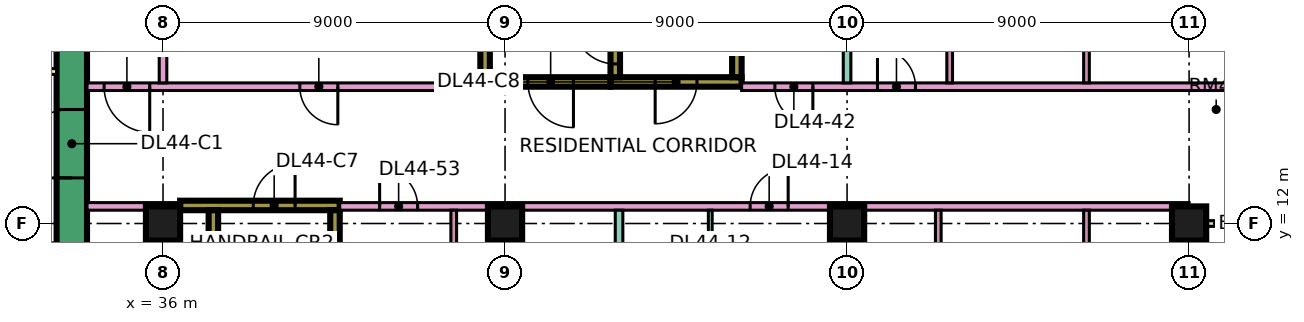
"""IFC4 building model, lengths in metres.
Left out: names, types, materials, properties, quantities, classifications, styles, units other than length and angle.
Written with IfcOpenShell. Run it as: python <this file> out.ifc"""

import sys

from ifc_helpers import new_model, si_unit, direction, frame, frame_2d, origin, origin_2d, place, context, subcontext, project, spatial, rectangle, extrude, element, fill, save


model = new_model("IFC4")
c1 = context("Model", 3, precision=1e-05, world=origin(), true_north=direction((0.0, 1.0)))
c2 = subcontext(c1, "Body", "Model", "MODEL_VIEW")
j1 = project(units=[si_unit("LENGTHUNIT", "METRE"), si_unit("PLANEANGLEUNIT", "RADIAN")], contexts=[c1])
p1 = place(None, origin())
s1 = spatial("IfcSite", under=j1, at=p1, CompositionType="ELEMENT")
p2 = place(p1, origin())
s2 = spatial("IfcBuilding", under=s1, at=p2, CompositionType="ELEMENT")
p3 = place(p2, frame((0.0, 0.0, 191.15)))
s3 = spatial("IfcBuildingStorey", under=s2, at=p3, CompositionType="ELEMENT", Elevation=191.15)
for number, where, z_axis, x_axis in (
    (1, (36.0, 12.0, 0.0), (0.0, 0.0, 1.0), (1.0, 0.0, 0.0)),
    (2, (45.0, 12.0, 0.0), (0.0, 0.0, 1.0), (1.0, 0.0, 0.0)),
    (3, (54.0, 12.0, 0.0), (0.0, 0.0, 1.0), (1.0, 0.0, 0.0)),
    (4, (63.0, 12.0, 0.0), (0.0, 0.0, 1.0), (1.0, 0.0, 0.0)),
):
    element("IfcColumn", number, at=place(p3, frame(where, z_axis=z_axis, x_axis=x_axis)), inside=s3, PredefinedType="COLUMN", context=c2, shape_type="SweptSolid", body=[
        extrude(rectangle(XDim=0.9, YDim=0.9, at=origin_2d()), origin(), (0.0, 0.0, 1.0), 3.75),
    ])
p4 = place(p3, frame((33.6, 7.8, 0.0), z_axis=(0.0, 0.0, 1.0), x_axis=(0.0, 1.0, 0.0)))
e5 = element("IfcWall", 5, at=p4, inside=s3, PredefinedType="SHEAR", context=c2, shape_type="SweptSolid", body=[
    extrude(rectangle(XDim=11.4, YDim=0.8, at=frame_2d((5.7, 0.0))), origin(), (0.0, 0.0, 1.0), 3.75),
])
p5 = place(p4, frame((5.4, 0.0, 0.0)))
e6 = element("IfcOpeningElement", 6, at=p5, cuts=e5, PredefinedType="OPENING", context=c2, shape_type="SweptSolid", body=[
    extrude(rectangle(XDim=1.8, YDim=2.4, at=frame_2d((0.9, 1.2))), frame((0.0, 0.41, 0.0), z_axis=(0.0, -1.0, 0.0), x_axis=(1.0, 0.0, 0.0)), (0.0, 0.0, 1.0), 0.82),
])
p6 = place(p3, frame((36.45, 12.475, 0.0), z_axis=(0.0, 0.0, 1.0), x_axis=(1.0, 0.0, 0.0)))
e7 = element("IfcWall", 7, at=p6, inside=s3, PredefinedType="SHEAR", context=c2, shape_type="SweptSolid", body=[
    extrude(rectangle(XDim=4.2, YDim=0.25, at=frame_2d((2.1, 0.0))), origin(), (0.0, 0.0, 1.0), 3.75),
])
p7 = place(p6, frame((1.925, 0.0, 0.0)))
e8 = element("IfcOpeningElement", 8, at=p7, cuts=e7, PredefinedType="OPENING", context=c2, shape_type="SweptSolid", body=[
    extrude(rectangle(XDim=1.1, YDim=2.2, at=frame_2d((0.55, 1.1))), frame((0.0, 0.135, 0.0), z_axis=(0.0, -1.0, 0.0), x_axis=(1.0, 0.0, 0.0)), (0.0, 0.0, 1.0), 0.27),
])
for number, where, z_axis, x_axis in (
    (9, (37.325, 5.85, 0.0), (0.0, 0.0, 1.0), (0.0, 1.0, 0.0)),
    (10, (40.525, 5.85, 0.0), (0.0, 0.0, 1.0), (0.0, 1.0, 0.0)),
):
    element("IfcWall", number, at=place(p3, frame(where, z_axis=z_axis, x_axis=x_axis)), inside=s3, PredefinedType="SHEAR", context=c2, shape_type="SweptSolid", body=[
        extrude(rectangle(XDim=6.5, YDim=0.25, at=frame_2d((3.25, 0.0))), origin(), (0.0, 0.0, 1.0), 3.75),
    ])
p8 = place(p3, frame((47.775, 15.725, 0.0), z_axis=(0.0, 0.0, 1.0), x_axis=(1.0, 0.0, 0.0)))
e11 = element("IfcWall", 11, at=p8, inside=s3, PredefinedType="SHEAR", context=c2, shape_type="SweptSolid", body=[
    extrude(rectangle(XDim=3.45, YDim=0.25, at=frame_2d((1.725, 0.0))), origin(), (0.0, 0.0, 1.0), 3.75),
])
p9 = place(p8, frame((1.175, 0.0, 0.0)))
e12 = element("IfcOpeningElement", 12, at=p9, cuts=e11, PredefinedType="OPENING", context=c2, shape_type="SweptSolid", body=[
    extrude(rectangle(XDim=1.1, YDim=2.2, at=frame_2d((0.55, 1.1))), frame((0.0, 0.135, 0.0), z_axis=(0.0, -1.0, 0.0), x_axis=(1.0, 0.0, 0.0)), (0.0, 0.0, 1.0), 0.27),
])
p10 = place(p3, frame((47.9, 15.85, 0.0), z_axis=(0.0, 0.0, 1.0), x_axis=(0.0, 1.0, 0.0)))
e13 = element("IfcWall", 13, at=p10, inside=s3, PredefinedType="SHEAR", context=c2, shape_type="SweptSolid", body=[
    extrude(rectangle(XDim=6.5, YDim=0.25, at=frame_2d((3.25, 0.0))), origin(), (0.0, 0.0, 1.0), 3.75),
])
p11 = place(p10, frame((0.35, 0.0, 0.0)))
e14 = element("IfcOpeningElement", 14, at=p11, cuts=e13, PredefinedType="OPENING", context=c2, shape_type="SweptSolid", body=[
    extrude(rectangle(XDim=1.1, YDim=2.2, at=frame_2d((0.55, 1.1))), frame((0.0, 0.135, 0.0), z_axis=(0.0, -1.0, 0.0), x_axis=(1.0, 0.0, 0.0)), (0.0, 0.0, 1.0), 0.27),
])
p12 = place(p3, frame((51.1, 15.85, 0.0), z_axis=(0.0, 0.0, 1.0), x_axis=(0.0, 1.0, 0.0)))
e15 = element("IfcWall", 15, at=p12, inside=s3, PredefinedType="SHEAR", context=c2, shape_type="SweptSolid", body=[
    extrude(rectangle(XDim=6.5, YDim=0.25, at=frame_2d((3.25, 0.0))), origin(), (0.0, 0.0, 1.0), 3.75),
])
p13 = place(p3, frame((44.35, 15.725, 0.0), z_axis=(0.0, 0.0, 1.0), x_axis=(1.0, 0.0, 0.0)))
e16 = element("IfcWall", 16, at=p13, inside=s3, PredefinedType="SHEAR", context=c2, shape_type="SweptSolid", body=[
    extrude(rectangle(XDim=3.425, YDim=0.25, at=frame_2d((1.712, 0.0))), origin(), (0.0, 0.0, 1.0), 3.75),
])
p14 = place(p13, frame((1.25, 0.0, 0.0)))
e17 = element("IfcOpeningElement", 17, at=p14, cuts=e16, PredefinedType="OPENING", context=c2, shape_type="SweptSolid", body=[
    extrude(rectangle(XDim=1.2, YDim=2.2, at=frame_2d((0.6, 1.1))), frame((0.0, 0.135, 0.0), z_axis=(0.0, -1.0, 0.0), x_axis=(1.0, 0.0, 0.0)), (0.0, 0.0, 1.0), 0.27),
])
p15 = place(p3, frame((44.475, 15.85, 0.0), z_axis=(0.0, 0.0, 1.0), x_axis=(0.0, 1.0, 0.0)))
e18 = element("IfcWall", 18, at=p15, inside=s3, PredefinedType="SHEAR", context=c2, shape_type="SweptSolid", body=[
    extrude(rectangle(XDim=6.5, YDim=0.25, at=frame_2d((3.25, 0.0))), origin(), (0.0, 0.0, 1.0), 3.75),
])
p16 = place(p15, frame((1.75, 0.0, 0.0)))
e19 = element("IfcOpeningElement", 19, at=p16, cuts=e18, PredefinedType="OPENING", context=c2, shape_type="SweptSolid", body=[
    extrude(rectangle(XDim=1.1, YDim=2.2, at=frame_2d((0.55, 1.1))), frame((0.0, 0.135, 0.0), z_axis=(0.0, -1.0, 0.0), x_axis=(1.0, 0.0, 0.0)), (0.0, 0.0, 1.0), 0.27),
])
p17 = place(p15, frame((4.3, 0.0, 0.0)))
e20 = element("IfcOpeningElement", 20, at=p17, cuts=e18, PredefinedType="OPENING", context=c2, shape_type="SweptSolid", body=[
    extrude(rectangle(XDim=1.1, YDim=2.2, at=frame_2d((0.55, 1.1))), frame((0.0, 0.135, 0.0), z_axis=(0.0, -1.0, 0.0), x_axis=(1.0, 0.0, 0.0)), (0.0, 0.0, 1.0), 0.27),
])
p18 = place(p3, frame((63.0, 1.575, 0.0), z_axis=(0.0, 0.0, 1.0), x_axis=(0.0, 1.0, 0.0)))
e21 = element("IfcWall", 21, at=p18, inside=s3, PredefinedType="SOLIDWALL", context=c2, shape_type="SweptSolid", body=[
    extrude(rectangle(XDim=10.35, YDim=0.15, at=frame_2d((5.175, 0.0))), origin(), (0.0, 0.0, 1.0), 3.35),
])
p19 = place(p18, frame((1.837, 0.0, 0.0)))
e22 = element("IfcOpeningElement", 22, at=p19, cuts=e21, PredefinedType="OPENING", context=c2, shape_type="SweptSolid", body=[
    extrude(rectangle(XDim=1.8, YDim=2.4, at=frame_2d((0.9, 1.2))), frame((0.0, 0.085, 0.0), z_axis=(0.0, -1.0, 0.0), x_axis=(1.0, 0.0, 0.0)), (0.0, 0.0, 1.0), 0.17),
])
p20 = place(p18, frame((7.675, 0.0, 1.7)))
e23 = element("IfcOpeningElement", 23, at=p20, cuts=e21, PredefinedType="OPENING", context=c2, shape_type="SweptSolid", body=[
    extrude(rectangle(XDim=1.2, YDim=0.9, at=frame_2d((0.6, 0.45))), frame((0.0, 0.085, 0.0), z_axis=(0.0, -1.0, 0.0), x_axis=(1.0, 0.0, 0.0)), (0.0, 0.0, 1.0), 0.17),
])
p21 = place(p3, frame((64.5, 12.0, 0.0), z_axis=(0.0, 0.0, 1.0), x_axis=(-1.0, 0.0, 0.0)))
e24 = element("IfcWall", 24, at=p21, inside=s3, PredefinedType="SOLIDWALL", context=c2, shape_type="SweptSolid", body=[
    extrude(rectangle(XDim=1.5, YDim=0.15, at=frame_2d((0.75, 0.0))), origin(), (0.0, 0.0, 1.0), 3.35),
])
p22 = place(p3, frame((31.2, 16.0, 0.0), z_axis=(0.0, 0.0, 1.0), x_axis=(1.0, 0.0, 0.0)))
e25 = element("IfcWall", 25, at=p22, inside=s3, PredefinedType="PARTITIONING", context=c2, shape_type="SweptSolid", body=[
    extrude(rectangle(XDim=2.0, YDim=0.15, at=frame_2d((1.0, 0.0))), origin(), (0.0, 0.0, 1.0), 3.35),
])
p23 = place(p3, frame((34.0, 12.45, 0.0), z_axis=(0.0, 0.0, 1.0), x_axis=(1.0, 0.0, 0.0)))
e26 = element("IfcWall", 26, at=p23, inside=s3, PredefinedType="PARTITIONING", context=c2, shape_type="SweptSolid", body=[
    extrude(rectangle(XDim=2.451, YDim=0.2, at=frame_2d((1.226, 0.0))), origin(), (0.0, 0.0, 1.0), 3.35),
])
p24 = place(p3, frame((34.0, 15.6, 0.0), z_axis=(0.0, 0.0, 1.0), x_axis=(1.0, 0.0, 0.0)))
e27 = element("IfcWall", 27, at=p24, inside=s3, PredefinedType="PARTITIONING", context=c2, shape_type="SweptSolid", body=[
    extrude(rectangle(XDim=10.35, YDim=0.2, at=frame_2d((5.175, 0.0))), origin(), (0.0, 0.0, 1.0), 3.35),
])
p25 = place(p24, frame((5.6, 0.0, 0.0)))
e28 = element("IfcOpeningElement", 28, at=p25, cuts=e27, PredefinedType="OPENING", context=c2, shape_type="SweptSolid", body=[
    extrude(rectangle(XDim=1.0, YDim=2.1, at=frame_2d((0.5, 1.05))), frame((0.0, 0.11, 0.0), z_axis=(0.0, -1.0, 0.0), x_axis=(1.0, 0.0, 0.0)), (0.0, 0.0, 1.0), 0.22),
])
p26 = place(p24, frame((0.45, 0.0, 0.0)))
e29 = element("IfcOpeningElement", 29, at=p26, cuts=e27, PredefinedType="OPENING", context=c2, shape_type="SweptSolid", body=[
    extrude(rectangle(XDim=1.2, YDim=2.1, at=frame_2d((0.6, 1.05))), frame((0.0, 0.11, 0.0), z_axis=(0.0, -1.0, 0.0), x_axis=(1.0, 0.0, 0.0)), (0.0, 0.0, 1.0), 0.22),
])
p27 = place(p3, frame((36.0, 15.7, 0.0), z_axis=(0.0, 0.0, 1.0), x_axis=(0.0, 1.0, 0.0)))
e30 = element("IfcWall", 30, at=p27, inside=s3, PredefinedType="PARTITIONING", context=c2, shape_type="SweptSolid", body=[
    extrude(rectangle(XDim=8.3, YDim=0.2, at=frame_2d((4.15, 0.0))), origin(), (0.0, 0.0, 1.0), 3.35),
])
p28 = place(p3, frame((40.65, 12.45, 0.0), z_axis=(0.0, 0.0, 1.0), x_axis=(1.0, 0.0, 0.0)))
e31 = element("IfcWall", 31, at=p28, inside=s3, PredefinedType="PARTITIONING", context=c2, shape_type="SweptSolid", body=[
    extrude(rectangle(XDim=22.35, YDim=0.2, at=frame_2d((11.175, 0.0))), origin(), (0.0, 0.0, 1.0), 3.35),
])
p29 = place(p28, frame((10.8, 0.0, 0.0)))
e32 = element("IfcOpeningElement", 32, at=p29, cuts=e31, PredefinedType="OPENING", context=c2, shape_type="SweptSolid", body=[
    extrude(rectangle(XDim=1.0, YDim=2.1, at=frame_2d((0.5, 1.05))), frame((0.0, 0.11, 0.0), z_axis=(0.0, -1.0, 0.0), x_axis=(1.0, 0.0, 0.0)), (0.0, 0.0, 1.0), 0.22),
])
p30 = place(p28, frame((1.05, 0.0, 0.0)))
e33 = element("IfcOpeningElement", 33, at=p30, cuts=e31, PredefinedType="OPENING", context=c2, shape_type="SweptSolid", body=[
    extrude(rectangle(XDim=1.0, YDim=2.1, at=frame_2d((0.5, 1.05))), frame((0.0, 0.11, 0.0), z_axis=(0.0, -1.0, 0.0), x_axis=(1.0, 0.0, 0.0)), (0.0, 0.0, 1.0), 0.22),
])
p31 = place(p3, frame((43.65, 5.825, 0.0), z_axis=(0.0, 0.0, 1.0), x_axis=(0.0, 1.0, 0.0)))
e34 = element("IfcWall", 34, at=p31, inside=s3, PredefinedType="PARTITIONING", context=c2, shape_type="SweptSolid", body=[
    extrude(rectangle(XDim=6.525, YDim=0.15, at=frame_2d((3.263, 0.0))), origin(), (0.0, 0.0, 1.0), 3.35),
])
p32 = place(p31, frame((4.425, 0.0, 0.0)))
e35 = element("IfcOpeningElement", 35, at=p32, cuts=e34, PredefinedType="OPENING", context=c2, shape_type="SweptSolid", body=[
    extrude(rectangle(XDim=0.9, YDim=2.1, at=frame_2d((0.45, 1.05))), frame((0.0, 0.085, 0.0), z_axis=(0.0, -1.0, 0.0), x_axis=(1.0, 0.0, 0.0)), (0.0, 0.0, 1.0), 0.17),
])
p33 = place(p3, frame((48.0, 0.0, 0.0), z_axis=(0.0, 0.0, 1.0), x_axis=(0.0, 1.0, 0.0)))
e36 = element("IfcWall", 36, at=p33, inside=s3, PredefinedType="PARTITIONING", context=c2, shape_type="SweptSolid", body=[
    extrude(rectangle(XDim=12.35, YDim=0.2, at=frame_2d((6.175, 0.0))), origin(), (0.0, 0.0, 1.0), 3.35),
])
p34 = place(p3, frame((50.4, 8.2, 0.0), z_axis=(0.0, 0.0, 1.0), x_axis=(0.0, 1.0, 0.0)))
e37 = element("IfcWall", 37, at=p34, inside=s3, PredefinedType="PARTITIONING", context=c2, shape_type="SweptSolid", body=[
    extrude(rectangle(XDim=4.15, YDim=0.1, at=frame_2d((2.075, 0.0))), origin(), (0.0, 0.0, 1.0), 3.35),
])
p35 = place(p34, frame((1.7, 0.0, 0.0)))
e38 = element("IfcOpeningElement", 38, at=p35, cuts=e37, PredefinedType="OPENING", context=c2, shape_type="SweptSolid", body=[
    extrude(rectangle(XDim=0.9, YDim=2.1, at=frame_2d((0.45, 1.05))), frame((0.0, 0.06, 0.0), z_axis=(0.0, -1.0, 0.0), x_axis=(1.0, 0.0, 0.0)), (0.0, 0.0, 1.0), 0.12),
])
p36 = place(p3, frame((51.225, 15.6, 0.0), z_axis=(0.0, 0.0, 1.0), x_axis=(1.0, 0.0, 0.0)))
e39 = element("IfcWall", 39, at=p36, inside=s3, PredefinedType="PARTITIONING", context=c2, shape_type="SweptSolid", body=[
    extrude(rectangle(XDim=13.125, YDim=0.2, at=frame_2d((6.562, 0.0))), origin(), (0.0, 0.0, 1.0), 3.35),
])
p37 = place(p36, frame((3.575, 0.0, 0.0)))
e40 = element("IfcOpeningElement", 40, at=p37, cuts=e39, PredefinedType="OPENING", context=c2, shape_type="SweptSolid", body=[
    extrude(rectangle(XDim=1.0, YDim=2.1, at=frame_2d((0.5, 1.05))), frame((0.0, 0.11, 0.0), z_axis=(0.0, -1.0, 0.0), x_axis=(1.0, 0.0, 0.0)), (0.0, 0.0, 1.0), 0.22),
])
p38 = place(p36, frame((0.875, 0.0, 0.0)))
e41 = element("IfcOpeningElement", 41, at=p38, cuts=e39, PredefinedType="OPENING", context=c2, shape_type="SweptSolid", body=[
    extrude(rectangle(XDim=1.0, YDim=2.1, at=frame_2d((0.5, 1.05))), frame((0.0, 0.11, 0.0), z_axis=(0.0, -1.0, 0.0), x_axis=(1.0, 0.0, 0.0)), (0.0, 0.0, 1.0), 0.22),
])
p39 = place(p3, frame((54.0, 15.7, 0.0), z_axis=(0.0, 0.0, 1.0), x_axis=(0.0, 1.0, 0.0)))
e42 = element("IfcWall", 42, at=p39, inside=s3, PredefinedType="PARTITIONING", context=c2, shape_type="SweptSolid", body=[
    extrude(rectangle(XDim=8.226, YDim=0.2, at=frame_2d((4.113, 0.0))), origin(), (0.0, 0.0, 1.0), 3.35),
])
p40 = place(p3, frame((56.4, 8.325, 0.0), z_axis=(0.0, 0.0, 1.0), x_axis=(0.0, 1.0, 0.0)))
e43 = element("IfcWall", 43, at=p40, inside=s3, PredefinedType="PARTITIONING", context=c2, shape_type="SweptSolid", body=[
    extrude(rectangle(XDim=4.025, YDim=0.15, at=frame_2d((2.013, 0.0))), origin(), (0.0, 0.0, 1.0), 3.35),
])
p41 = place(p3, frame((56.7, 15.7, 0.0), z_axis=(0.0, 0.0, 1.0), x_axis=(0.0, 1.0, 0.0)))
e44 = element("IfcWall", 44, at=p41, inside=s3, PredefinedType="PARTITIONING", context=c2, shape_type="SweptSolid", body=[
    extrude(rectangle(XDim=2.525, YDim=0.15, at=frame_2d((1.263, 0.0))), origin(), (0.0, 0.0, 1.0), 3.35),
])
p42 = place(p3, frame((60.3, 8.325, 0.0), z_axis=(0.0, 0.0, 1.0), x_axis=(0.0, 1.0, 0.0)))
e45 = element("IfcWall", 45, at=p42, inside=s3, PredefinedType="PARTITIONING", context=c2, shape_type="SweptSolid", body=[
    extrude(rectangle(XDim=4.025, YDim=0.15, at=frame_2d((2.013, 0.0))), origin(), (0.0, 0.0, 1.0), 3.35),
])
p43 = place(p3, frame((60.3, 15.7, 0.0), z_axis=(0.0, 0.0, 1.0), x_axis=(0.0, 1.0, 0.0)))
e46 = element("IfcWall", 46, at=p43, inside=s3, PredefinedType="PARTITIONING", context=c2, shape_type="SweptSolid", body=[
    extrude(rectangle(XDim=2.525, YDim=0.15, at=frame_2d((1.263, 0.0))), origin(), (0.0, 0.0, 1.0), 3.35),
])
p44 = place(p5, origin())
e47 = element("IfcDoor", 47, at=p44, inside=s3, OperationType="DOUBLE_DOOR_SINGLE_SWING", PredefinedType="DOOR", context=c2, shape_type="SweptSolid", body=[
    extrude(rectangle(XDim=1.8, YDim=2.4, at=frame_2d((0.9, 1.2))), frame((0.0, 0.025, 0.0), z_axis=(0.0, -1.0, 0.0), x_axis=(1.0, 0.0, 0.0)), (0.0, 0.0, 1.0), 0.05),
])
fill(e6, e47)
p45 = place(p7, frame((1.1, 0.0, 0.0), z_axis=(0.0, 0.0, 1.0), x_axis=(-1.0, 0.0, 0.0)))
e48 = element("IfcDoor", 48, at=p45, inside=s3, OperationType="SINGLE_SWING_RIGHT", PredefinedType="DOOR", context=c2, shape_type="SweptSolid", body=[
    extrude(rectangle(XDim=1.1, YDim=2.2, at=frame_2d((0.55, 1.1))), frame((0.0, 0.025, 0.0), z_axis=(0.0, -1.0, 0.0), x_axis=(1.0, 0.0, 0.0)), (0.0, 0.0, 1.0), 0.05),
])
fill(e8, e48)
p46 = place(p9, frame((1.1, 0.0, 0.0), z_axis=(0.0, 0.0, 1.0), x_axis=(-1.0, 0.0, 0.0)))
e49 = element("IfcDoor", 49, at=p46, inside=s3, OperationType="SINGLE_SWING_LEFT", PredefinedType="DOOR", context=c2, shape_type="SweptSolid", body=[
    extrude(rectangle(XDim=1.1, YDim=2.2, at=frame_2d((0.55, 1.1))), frame((0.0, 0.025, 0.0), z_axis=(0.0, -1.0, 0.0), x_axis=(1.0, 0.0, 0.0)), (0.0, 0.0, 1.0), 0.05),
])
fill(e12, e49)
p47 = place(p14, origin())
e50 = element("IfcDoor", 50, at=p47, inside=s3, OperationType="SINGLE_SWING_RIGHT", PredefinedType="DOOR", context=c2, shape_type="SweptSolid", body=[
    extrude(rectangle(XDim=1.2, YDim=2.2, at=frame_2d((0.6, 1.1))), frame((0.0, 0.025, 0.0), z_axis=(0.0, -1.0, 0.0), x_axis=(1.0, 0.0, 0.0)), (0.0, 0.0, 1.0), 0.05),
])
fill(e17, e50)
p48 = place(p11, frame((1.1, 0.0, 0.0), z_axis=(0.0, 0.0, 1.0), x_axis=(-1.0, 0.0, 0.0)))
e51 = element("IfcDoor", 51, at=p48, inside=s3, OperationType="SINGLE_SWING_RIGHT", PredefinedType="DOOR", context=c2, shape_type="SweptSolid", body=[
    extrude(rectangle(XDim=1.1, YDim=2.2, at=frame_2d((0.55, 1.1))), frame((0.0, 0.025, 0.0), z_axis=(0.0, -1.0, 0.0), x_axis=(1.0, 0.0, 0.0)), (0.0, 0.0, 1.0), 0.05),
])
fill(e14, e51)
p49 = place(p25, origin())
e52 = element("IfcDoor", 52, at=p49, inside=s3, OperationType="SINGLE_SWING_RIGHT", PredefinedType="DOOR", context=c2, shape_type="SweptSolid", body=[
    extrude(rectangle(XDim=1.0, YDim=2.1, at=frame_2d((0.5, 1.05))), frame((0.0, 0.025, 0.0), z_axis=(0.0, -1.0, 0.0), x_axis=(1.0, 0.0, 0.0)), (0.0, 0.0, 1.0), 0.05),
])
fill(e28, e52)
p50 = place(p37, origin())
e53 = element("IfcDoor", 53, at=p50, inside=s3, OperationType="SINGLE_SWING_LEFT", PredefinedType="DOOR", context=c2, shape_type="SweptSolid", body=[
    extrude(rectangle(XDim=1.0, YDim=2.1, at=frame_2d((0.5, 1.05))), frame((0.0, 0.025, 0.0), z_axis=(0.0, -1.0, 0.0), x_axis=(1.0, 0.0, 0.0)), (0.0, 0.0, 1.0), 0.05),
])
fill(e40, e53)
p51 = place(p29, frame((1.0, 0.0, 0.0), z_axis=(0.0, 0.0, 1.0), x_axis=(-1.0, 0.0, 0.0)))
e54 = element("IfcDoor", 54, at=p51, inside=s3, OperationType="SINGLE_SWING_RIGHT", PredefinedType="DOOR", context=c2, shape_type="SweptSolid", body=[
    extrude(rectangle(XDim=1.0, YDim=2.1, at=frame_2d((0.5, 1.05))), frame((0.0, 0.025, 0.0), z_axis=(0.0, -1.0, 0.0), x_axis=(1.0, 0.0, 0.0)), (0.0, 0.0, 1.0), 0.05),
])
fill(e32, e54)
p52 = place(p26, origin())
e55 = element("IfcDoor", 55, at=p52, inside=s3, OperationType="SINGLE_SWING_RIGHT", PredefinedType="DOOR", context=c2, shape_type="SweptSolid", body=[
    extrude(rectangle(XDim=1.2, YDim=2.1, at=frame_2d((0.6, 1.05))), frame((0.0, 0.025, 0.0), z_axis=(0.0, -1.0, 0.0), x_axis=(1.0, 0.0, 0.0)), (0.0, 0.0, 1.0), 0.05),
])
fill(e29, e55)
p53 = place(p38, origin())
e56 = element("IfcDoor", 56, at=p53, inside=s3, OperationType="SINGLE_SWING_RIGHT", PredefinedType="DOOR", context=c2, shape_type="SweptSolid", body=[
    extrude(rectangle(XDim=1.0, YDim=2.1, at=frame_2d((0.5, 1.05))), frame((0.0, 0.025, 0.0), z_axis=(0.0, -1.0, 0.0), x_axis=(1.0, 0.0, 0.0)), (0.0, 0.0, 1.0), 0.05),
])
fill(e41, e56)
p54 = place(p30, origin())
e57 = element("IfcDoor", 57, at=p54, inside=s3, OperationType="SINGLE_SWING_LEFT", PredefinedType="DOOR", context=c2, shape_type="SweptSolid", body=[
    extrude(rectangle(XDim=1.0, YDim=2.1, at=frame_2d((0.5, 1.05))), frame((0.0, 0.025, 0.0), z_axis=(0.0, -1.0, 0.0), x_axis=(1.0, 0.0, 0.0)), (0.0, 0.0, 1.0), 0.05),
])
fill(e33, e57)
save(model, sys.argv[1])
